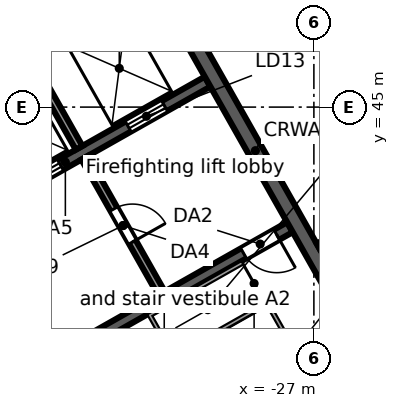
"""IFC4 building model, lengths in metres.
Left out: names, types, materials, properties, quantities, classifications, styles, units other than length and angle.
Written with IfcOpenShell. Run it as: python <this file> out.ifc"""

import sys

from ifc_helpers import new_model, si_unit, direction, frame, frame_2d, origin, place, context, subcontext, project, spatial, rectangle, extrude, element, fill, save


model = new_model("IFC4")
c1 = context("Model", 3, precision=1e-05, world=origin(), true_north=direction((0.0, 1.0)))
c2 = subcontext(c1, "Body", "Model", "MODEL_VIEW")
j1 = project(units=[si_unit("LENGTHUNIT", "METRE"), si_unit("PLANEANGLEUNIT", "RADIAN")], contexts=[c1])
p1 = place(None, origin())
s1 = spatial("IfcSite", under=j1, at=p1, CompositionType="ELEMENT")
p2 = place(p1, origin())
s2 = spatial("IfcBuilding", under=s1, at=p2, CompositionType="ELEMENT")
p3 = place(p2, frame((0.0, 0.0, 308.3)))
s3 = spatial("IfcBuildingStorey", under=s2, at=p3, CompositionType="ELEMENT", Elevation=308.3)
p4 = place(p3, frame((-58.732, 38.771, 0.0), z_axis=(0.0, 0.0, 1.0), x_axis=(0.870355615581, 0.492423702137, 0.0)))
e1 = element("IfcWall", 1, at=p4, inside=s3, PredefinedType="STANDARD", context=c2, shape_type="SweptSolid", body=[
    extrude(rectangle(XDim=64.052, YDim=0.25, at=frame_2d((32.026, 0.0))), origin(), (0.0, 0.0, 1.0), 3.45),
])
p5 = place(p4, frame((61.259, 0.0, 0.8)))
e2 = element("IfcOpeningElement", 2, at=p5, cuts=e1, PredefinedType="OPENING", context=c2, shape_type="SweptSolid", body=[
    extrude(rectangle(XDim=2.4, YDim=2.2, at=frame_2d((1.2, 1.1))), frame((0.0, 0.135, 0.0), z_axis=(0.0, -1.0, 0.0), x_axis=(1.0, 0.0, 0.0)), (0.0, 0.0, 1.0), 0.27),
])
p6 = place(p4, frame((58.216, 0.0, 0.8)))
e3 = element("IfcOpeningElement", 3, at=p6, cuts=e1, PredefinedType="OPENING", context=c2, shape_type="SweptSolid", body=[
    extrude(rectangle(XDim=2.4, YDim=2.2, at=frame_2d((1.2, 1.1))), frame((0.0, 0.135, 0.0), z_axis=(0.0, -1.0, 0.0), x_axis=(1.0, 0.0, 0.0)), (0.0, 0.0, 1.0), 0.27),
])
p7 = place(p4, frame((55.173, 0.0, 0.8)))
e4 = element("IfcOpeningElement", 4, at=p7, cuts=e1, PredefinedType="OPENING", context=c2, shape_type="SweptSolid", body=[
    extrude(rectangle(XDim=2.4, YDim=2.2, at=frame_2d((1.2, 1.1))), frame((0.0, 0.135, 0.0), z_axis=(0.0, -1.0, 0.0), x_axis=(1.0, 0.0, 0.0)), (0.0, 0.0, 1.0), 0.27),
])
p8 = place(p4, frame((52.129, 0.0, 0.8)))
e5 = element("IfcOpeningElement", 5, at=p8, cuts=e1, PredefinedType="OPENING", context=c2, shape_type="SweptSolid", body=[
    extrude(rectangle(XDim=2.4, YDim=2.2, at=frame_2d((1.2, 1.1))), frame((0.0, 0.135, 0.0), z_axis=(0.0, -1.0, 0.0), x_axis=(1.0, 0.0, 0.0)), (0.0, 0.0, 1.0), 0.27),
])
p9 = place(p4, frame((49.086, 0.0, 0.8)))
e6 = element("IfcOpeningElement", 6, at=p9, cuts=e1, PredefinedType="OPENING", context=c2, shape_type="SweptSolid", body=[
    extrude(rectangle(XDim=2.4, YDim=2.2, at=frame_2d((1.2, 1.1))), frame((0.0, 0.135, 0.0), z_axis=(0.0, -1.0, 0.0), x_axis=(1.0, 0.0, 0.0)), (0.0, 0.0, 1.0), 0.27),
])
p10 = place(p4, frame((46.043, 0.0, 0.8)))
e7 = element("IfcOpeningElement", 7, at=p10, cuts=e1, PredefinedType="OPENING", context=c2, shape_type="SweptSolid", body=[
    extrude(rectangle(XDim=2.4, YDim=2.2, at=frame_2d((1.2, 1.1))), frame((0.0, 0.135, 0.0), z_axis=(0.0, -1.0, 0.0), x_axis=(1.0, 0.0, 0.0)), (0.0, 0.0, 1.0), 0.27),
])
p11 = place(p4, frame((43.0, 0.0, 0.8)))
e8 = element("IfcOpeningElement", 8, at=p11, cuts=e1, PredefinedType="OPENING", context=c2, shape_type="SweptSolid", body=[
    extrude(rectangle(XDim=2.4, YDim=2.2, at=frame_2d((1.2, 1.1))), frame((0.0, 0.135, 0.0), z_axis=(0.0, -1.0, 0.0), x_axis=(1.0, 0.0, 0.0)), (0.0, 0.0, 1.0), 0.27),
])
p12 = place(p4, frame((39.956, 0.0, 0.8)))
e9 = element("IfcOpeningElement", 9, at=p12, cuts=e1, PredefinedType="OPENING", context=c2, shape_type="SweptSolid", body=[
    extrude(rectangle(XDim=2.4, YDim=2.2, at=frame_2d((1.2, 1.1))), frame((0.0, 0.135, 0.0), z_axis=(0.0, -1.0, 0.0), x_axis=(1.0, 0.0, 0.0)), (0.0, 0.0, 1.0), 0.27),
])
p13 = place(p4, frame((36.913, 0.0, 0.8)))
e10 = element("IfcOpeningElement", 10, at=p13, cuts=e1, PredefinedType="OPENING", context=c2, shape_type="SweptSolid", body=[
    extrude(rectangle(XDim=2.4, YDim=2.2, at=frame_2d((1.2, 1.1))), frame((0.0, 0.135, 0.0), z_axis=(0.0, -1.0, 0.0), x_axis=(1.0, 0.0, 0.0)), (0.0, 0.0, 1.0), 0.27),
])
p14 = place(p4, frame((33.87, 0.0, 0.8)))
e11 = element("IfcOpeningElement", 11, at=p14, cuts=e1, PredefinedType="OPENING", context=c2, shape_type="SweptSolid", body=[
    extrude(rectangle(XDim=2.4, YDim=2.2, at=frame_2d((1.2, 1.1))), frame((0.0, 0.135, 0.0), z_axis=(0.0, -1.0, 0.0), x_axis=(1.0, 0.0, 0.0)), (0.0, 0.0, 1.0), 0.27),
])
p15 = place(p4, frame((30.826, 0.0, 0.8)))
e12 = element("IfcOpeningElement", 12, at=p15, cuts=e1, PredefinedType="OPENING", context=c2, shape_type="SweptSolid", body=[
    extrude(rectangle(XDim=2.4, YDim=2.2, at=frame_2d((1.2, 1.1))), frame((0.0, 0.135, 0.0), z_axis=(0.0, -1.0, 0.0), x_axis=(1.0, 0.0, 0.0)), (0.0, 0.0, 1.0), 0.27),
])
p16 = place(p4, frame((27.783, 0.0, 0.8)))
e13 = element("IfcOpeningElement", 13, at=p16, cuts=e1, PredefinedType="OPENING", context=c2, shape_type="SweptSolid", body=[
    extrude(rectangle(XDim=2.4, YDim=2.2, at=frame_2d((1.2, 1.1))), frame((0.0, 0.135, 0.0), z_axis=(0.0, -1.0, 0.0), x_axis=(1.0, 0.0, 0.0)), (0.0, 0.0, 1.0), 0.27),
])
p17 = place(p4, frame((24.74, 0.0, 0.8)))
e14 = element("IfcOpeningElement", 14, at=p17, cuts=e1, PredefinedType="OPENING", context=c2, shape_type="SweptSolid", body=[
    extrude(rectangle(XDim=2.4, YDim=2.2, at=frame_2d((1.2, 1.1))), frame((0.0, 0.135, 0.0), z_axis=(0.0, -1.0, 0.0), x_axis=(1.0, 0.0, 0.0)), (0.0, 0.0, 1.0), 0.27),
])
p18 = place(p4, frame((21.696, 0.0, 0.8)))
e15 = element("IfcOpeningElement", 15, at=p18, cuts=e1, PredefinedType="OPENING", context=c2, shape_type="SweptSolid", body=[
    extrude(rectangle(XDim=2.4, YDim=2.2, at=frame_2d((1.2, 1.1))), frame((0.0, 0.135, 0.0), z_axis=(0.0, -1.0, 0.0), x_axis=(1.0, 0.0, 0.0)), (0.0, 0.0, 1.0), 0.27),
])
p19 = place(p4, frame((18.653, 0.0, 0.8)))
e16 = element("IfcOpeningElement", 16, at=p19, cuts=e1, PredefinedType="OPENING", context=c2, shape_type="SweptSolid", body=[
    extrude(rectangle(XDim=2.4, YDim=2.2, at=frame_2d((1.2, 1.1))), frame((0.0, 0.135, 0.0), z_axis=(0.0, -1.0, 0.0), x_axis=(1.0, 0.0, 0.0)), (0.0, 0.0, 1.0), 0.27),
])
p20 = place(p4, frame((15.61, 0.0, 0.8)))
e17 = element("IfcOpeningElement", 17, at=p20, cuts=e1, PredefinedType="OPENING", context=c2, shape_type="SweptSolid", body=[
    extrude(rectangle(XDim=2.4, YDim=2.2, at=frame_2d((1.2, 1.1))), frame((0.0, 0.135, 0.0), z_axis=(0.0, -1.0, 0.0), x_axis=(1.0, 0.0, 0.0)), (0.0, 0.0, 1.0), 0.27),
])
p21 = place(p4, frame((12.567, 0.0, 0.8)))
e18 = element("IfcOpeningElement", 18, at=p21, cuts=e1, PredefinedType="OPENING", context=c2, shape_type="SweptSolid", body=[
    extrude(rectangle(XDim=2.4, YDim=2.2, at=frame_2d((1.2, 1.1))), frame((0.0, 0.135, 0.0), z_axis=(0.0, -1.0, 0.0), x_axis=(1.0, 0.0, 0.0)), (0.0, 0.0, 1.0), 0.27),
])
p22 = place(p4, frame((9.523, 0.0, 0.8)))
e19 = element("IfcOpeningElement", 19, at=p22, cuts=e1, PredefinedType="OPENING", context=c2, shape_type="SweptSolid", body=[
    extrude(rectangle(XDim=2.4, YDim=2.2, at=frame_2d((1.2, 1.1))), frame((0.0, 0.135, 0.0), z_axis=(0.0, -1.0, 0.0), x_axis=(1.0, 0.0, 0.0)), (0.0, 0.0, 1.0), 0.27),
])
p23 = place(p4, frame((6.48, 0.0, 0.8)))
e20 = element("IfcOpeningElement", 20, at=p23, cuts=e1, PredefinedType="OPENING", context=c2, shape_type="SweptSolid", body=[
    extrude(rectangle(XDim=2.4, YDim=2.2, at=frame_2d((1.2, 1.1))), frame((0.0, 0.135, 0.0), z_axis=(0.0, -1.0, 0.0), x_axis=(1.0, 0.0, 0.0)), (0.0, 0.0, 1.0), 0.27),
])
p24 = place(p4, frame((3.437, 0.0, 0.8)))
e21 = element("IfcOpeningElement", 21, at=p24, cuts=e1, PredefinedType="OPENING", context=c2, shape_type="SweptSolid", body=[
    extrude(rectangle(XDim=2.4, YDim=2.2, at=frame_2d((1.2, 1.1))), frame((0.0, 0.135, 0.0), z_axis=(0.0, -1.0, 0.0), x_axis=(1.0, 0.0, 0.0)), (0.0, 0.0, 1.0), 0.27),
])
p25 = place(p4, frame((0.393, 0.0, 0.8)))
e22 = element("IfcOpeningElement", 22, at=p25, cuts=e1, PredefinedType="OPENING", context=c2, shape_type="SweptSolid", body=[
    extrude(rectangle(XDim=2.4, YDim=2.2, at=frame_2d((1.2, 1.1))), frame((0.0, 0.135, 0.0), z_axis=(0.0, -1.0, 0.0), x_axis=(1.0, 0.0, 0.0)), (0.0, 0.0, 1.0), 0.27),
])
p26 = place(p3, frame((-3.017, 46.293, 0.0), z_axis=(0.0, 0.0, 1.0), x_axis=(-0.870355474887, -0.492423950812, 0.0)))
e23 = element("IfcWall", 23, at=p26, inside=s3, PredefinedType="STANDARD", context=c2, shape_type="SweptSolid", body=[
    extrude(rectangle(XDim=40.34, YDim=0.25, at=frame_2d((20.17, 0.0))), origin(), (0.0, 0.0, 1.0), 3.45),
])
p27 = place(p26, frame((37.428, 0.0, 0.8)))
e24 = element("IfcOpeningElement", 24, at=p27, cuts=e23, PredefinedType="OPENING", context=c2, shape_type="SweptSolid", body=[
    extrude(rectangle(XDim=2.4, YDim=2.2, at=frame_2d((1.2, 1.1))), frame((0.0, 0.135, 0.0), z_axis=(0.0, -1.0, 0.0), x_axis=(1.0, 0.0, 0.0)), (0.0, 0.0, 1.0), 0.27),
])
p28 = place(p26, frame((34.372, 0.0, 0.0)))
e25 = element("IfcOpeningElement", 25, at=p28, cuts=e23, PredefinedType="OPENING", context=c2, shape_type="SweptSolid", body=[
    extrude(rectangle(XDim=1.8, YDim=2.4, at=frame_2d((0.9, 1.2))), frame((0.0, 0.135, 0.0), z_axis=(0.0, -1.0, 0.0), x_axis=(1.0, 0.0, 0.0)), (0.0, 0.0, 1.0), 0.27),
])
p29 = place(p26, frame((30.716, 0.0, 0.8)))
e26 = element("IfcOpeningElement", 26, at=p29, cuts=e23, PredefinedType="OPENING", context=c2, shape_type="SweptSolid", body=[
    extrude(rectangle(XDim=2.4, YDim=2.2, at=frame_2d((1.2, 1.1))), frame((0.0, 0.135, 0.0), z_axis=(0.0, -1.0, 0.0), x_axis=(1.0, 0.0, 0.0)), (0.0, 0.0, 1.0), 0.27),
])
p30 = place(p26, frame((27.36, 0.0, 0.8)))
e27 = element("IfcOpeningElement", 27, at=p30, cuts=e23, PredefinedType="OPENING", context=c2, shape_type="SweptSolid", body=[
    extrude(rectangle(XDim=2.4, YDim=2.2, at=frame_2d((1.2, 1.1))), frame((0.0, 0.135, 0.0), z_axis=(0.0, -1.0, 0.0), x_axis=(1.0, 0.0, 0.0)), (0.0, 0.0, 1.0), 0.27),
])
p31 = place(p26, frame((24.304, 0.0, 0.0)))
e28 = element("IfcOpeningElement", 28, at=p31, cuts=e23, PredefinedType="OPENING", context=c2, shape_type="SweptSolid", body=[
    extrude(rectangle(XDim=1.8, YDim=2.4, at=frame_2d((0.9, 1.2))), frame((0.0, 0.135, 0.0), z_axis=(0.0, -1.0, 0.0), x_axis=(1.0, 0.0, 0.0)), (0.0, 0.0, 1.0), 0.27),
])
p32 = place(p26, frame((20.648, 0.0, 0.8)))
e29 = element("IfcOpeningElement", 29, at=p32, cuts=e23, PredefinedType="OPENING", context=c2, shape_type="SweptSolid", body=[
    extrude(rectangle(XDim=2.4, YDim=2.2, at=frame_2d((1.2, 1.1))), frame((0.0, 0.135, 0.0), z_axis=(0.0, -1.0, 0.0), x_axis=(1.0, 0.0, 0.0)), (0.0, 0.0, 1.0), 0.27),
])
p33 = place(p26, frame((17.292, 0.0, 0.8)))
e30 = element("IfcOpeningElement", 30, at=p33, cuts=e23, PredefinedType="OPENING", context=c2, shape_type="SweptSolid", body=[
    extrude(rectangle(XDim=2.4, YDim=2.2, at=frame_2d((1.2, 1.1))), frame((0.0, 0.135, 0.0), z_axis=(0.0, -1.0, 0.0), x_axis=(1.0, 0.0, 0.0)), (0.0, 0.0, 1.0), 0.27),
])
p34 = place(p26, frame((14.236, 0.0, 0.0)))
e31 = element("IfcOpeningElement", 31, at=p34, cuts=e23, PredefinedType="OPENING", context=c2, shape_type="SweptSolid", body=[
    extrude(rectangle(XDim=1.8, YDim=2.4, at=frame_2d((0.9, 1.2))), frame((0.0, 0.135, 0.0), z_axis=(0.0, -1.0, 0.0), x_axis=(1.0, 0.0, 0.0)), (0.0, 0.0, 1.0), 0.27),
])
p35 = place(p26, frame((10.58, 0.0, 0.8)))
e32 = element("IfcOpeningElement", 32, at=p35, cuts=e23, PredefinedType="OPENING", context=c2, shape_type="SweptSolid", body=[
    extrude(rectangle(XDim=2.4, YDim=2.2, at=frame_2d((1.2, 1.1))), frame((0.0, 0.135, 0.0), z_axis=(0.0, -1.0, 0.0), x_axis=(1.0, 0.0, 0.0)), (0.0, 0.0, 1.0), 0.27),
])
p36 = place(p26, frame((7.224, 0.0, 0.8)))
e33 = element("IfcOpeningElement", 33, at=p36, cuts=e23, PredefinedType="OPENING", context=c2, shape_type="SweptSolid", body=[
    extrude(rectangle(XDim=2.4, YDim=2.2, at=frame_2d((1.2, 1.1))), frame((0.0, 0.135, 0.0), z_axis=(0.0, -1.0, 0.0), x_axis=(1.0, 0.0, 0.0)), (0.0, 0.0, 1.0), 0.27),
])
p37 = place(p26, frame((4.168, 0.0, 0.0)))
e34 = element("IfcOpeningElement", 34, at=p37, cuts=e23, PredefinedType="OPENING", context=c2, shape_type="SweptSolid", body=[
    extrude(rectangle(XDim=1.8, YDim=2.4, at=frame_2d((0.9, 1.2))), frame((0.0, 0.135, 0.0), z_axis=(0.0, -1.0, 0.0), x_axis=(1.0, 0.0, 0.0)), (0.0, 0.0, 1.0), 0.27),
])
p38 = place(p26, frame((0.512, 0.0, 0.8)))
e35 = element("IfcOpeningElement", 35, at=p38, cuts=e23, PredefinedType="OPENING", context=c2, shape_type="SweptSolid", body=[
    extrude(rectangle(XDim=2.4, YDim=2.2, at=frame_2d((1.2, 1.1))), frame((0.0, 0.135, 0.0), z_axis=(0.0, -1.0, 0.0), x_axis=(1.0, 0.0, 0.0)), (0.0, 0.0, 1.0), 0.27),
])
p39 = place(p3, frame((-34.245, 38.097, 0.0), z_axis=(0.0, 0.0, 1.0), x_axis=(0.870356351998, 0.492422400523, 0.0)))
e36 = element("IfcWall", 36, at=p39, inside=s3, PredefinedType="SOLIDWALL", context=c2, shape_type="SweptSolid", body=[
    extrude(rectangle(XDim=7.6, YDim=0.3, at=frame_2d((3.8, 0.0))), origin(), (0.0, 0.0, 1.0), 3.45),
])
p40 = place(p39, frame((6.2, 0.0, 0.0)))
e37 = element("IfcOpeningElement", 37, at=p40, cuts=e36, PredefinedType="OPENING", context=c2, shape_type="SweptSolid", body=[
    extrude(rectangle(XDim=1.0, YDim=2.1, at=frame_2d((0.5, 1.05))), frame((0.0, 0.16, 0.0), z_axis=(0.0, -1.0, 0.0), x_axis=(1.0, 0.0, 0.0)), (0.0, 0.0, 1.0), 0.32),
])
p41 = place(p3, frame((-37.282, 41.435, 0.0), z_axis=(0.0, 0.0, 1.0), x_axis=(0.870361315115, 0.492413628113, 0.0)))
e38 = element("IfcWall", 38, at=p41, inside=s3, PredefinedType="SOLIDWALL", context=c2, shape_type="SweptSolid", body=[
    extrude(rectangle(XDim=8.6, YDim=0.3, at=frame_2d((4.3, 0.0))), origin(), (0.0, 0.0, 1.0), 3.45),
])
p42 = place(p41, frame((0.65, 0.0, 0.0)))
e39 = element("IfcOpeningElement", 39, at=p42, cuts=e38, PredefinedType="OPENING", context=c2, shape_type="SweptSolid", body=[
    extrude(rectangle(XDim=1.1, YDim=2.1, at=frame_2d((0.55, 1.05))), frame((0.0, 0.16, 0.0), z_axis=(0.0, -1.0, 0.0), x_axis=(1.0, 0.0, 0.0)), (0.0, 0.0, 1.0), 0.32),
])
p43 = place(p41, frame((3.05, 0.0, 0.0)))
e40 = element("IfcOpeningElement", 40, at=p43, cuts=e38, PredefinedType="OPENING", context=c2, shape_type="SweptSolid", body=[
    extrude(rectangle(XDim=1.1, YDim=2.1, at=frame_2d((0.55, 1.05))), frame((0.0, 0.16, 0.0), z_axis=(0.0, -1.0, 0.0), x_axis=(1.0, 0.0, 0.0)), (0.0, 0.0, 1.0), 0.32),
])
p44 = place(p41, frame((6.2, 0.0, 0.0)))
e41 = element("IfcOpeningElement", 41, at=p44, cuts=e38, PredefinedType="OPENING", context=c2, shape_type="SweptSolid", body=[
    extrude(rectangle(XDim=1.1, YDim=2.1, at=frame_2d((0.55, 1.05))), frame((0.0, 0.16, 0.0), z_axis=(0.0, -1.0, 0.0), x_axis=(1.0, 0.0, 0.0)), (0.0, 0.0, 1.0), 0.32),
])
p45 = place(p3, frame((-46.51, 41.499, 0.0), z_axis=(0.0, 0.0, 1.0), x_axis=(0.870356271124, 0.492422543467, 0.0)))
e42 = element("IfcWall", 42, at=p45, inside=s3, PredefinedType="SOLIDWALL", context=c2, shape_type="SweptSolid", body=[
    extrude(rectangle(XDim=17.0, YDim=0.4, at=frame_2d((8.5, 0.0))), origin(), (0.0, 0.0, 1.0), 3.45),
])
p46 = place(p3, frame((-33.031, 43.667, 0.0), z_axis=(0.0, 0.0, 1.0), x_axis=(0.492408451753, -0.87036424366, 0.0)))
e43 = element("IfcWall", 43, at=p46, inside=s3, PredefinedType="PARTITIONING", context=c2, shape_type="SweptSolid", body=[
    extrude(rectangle(XDim=4.1, YDim=0.2, at=frame_2d((2.05, 0.0))), origin(), (0.0, 0.0, 1.0), 3.45),
])
p47 = place(p46, frame((1.55, 0.0, 0.0)))
e44 = element("IfcOpeningElement", 44, at=p47, cuts=e43, PredefinedType="OPENING", context=c2, shape_type="SweptSolid", body=[
    extrude(rectangle(XDim=1.0, YDim=2.1, at=frame_2d((0.5, 1.05))), frame((0.0, 0.11, 0.0), z_axis=(0.0, -1.0, 0.0), x_axis=(1.0, 0.0, 0.0)), (0.0, 0.0, 1.0), 0.22),
])
p48 = place(p3, frame((-35.271, 47.628, 0.0), z_axis=(0.0, 0.0, 1.0), x_axis=(0.492422543467, -0.870356271124, 0.0)))
e45 = element("IfcWall", 45, at=p48, inside=s3, PredefinedType="SOLIDWALL", context=c2, shape_type="SweptSolid", body=[
    extrude(rectangle(XDim=4.25, YDim=0.2, at=frame_2d((2.125, 0.0))), origin(), (0.0, 0.0, 1.0), 3.45),
])
p49 = place(p3, frame((-31.79, 49.597, 0.0), z_axis=(0.0, 0.0, 1.0), x_axis=(0.492421663121, -0.870356769198, 0.0)))
e46 = element("IfcWall", 46, at=p49, inside=s3, PredefinedType="SOLIDWALL", context=c2, shape_type="SweptSolid", body=[
    extrude(rectangle(XDim=13.2, YDim=0.4, at=frame_2d((6.6, 0.0))), origin(), (0.0, 0.0, 1.0), 3.45),
])
p50 = place(p3, frame((-26.888, 41.34, 0.0), z_axis=(0.0, 0.0, 1.0), x_axis=(0.8702292093, 0.492647057518, 0.0)))
e47 = element("IfcWall", 47, at=p50, inside=s3, PredefinedType="PARTITIONING", context=c2, shape_type="SweptSolid", body=[
    extrude(rectangle(XDim=3.0, YDim=0.15, at=frame_2d((1.5, 0.0))), origin(), (0.0, 0.0, 1.0), 2.622),
])
p51 = place(p43, origin())
e48 = element("IfcDoor", 48, at=p51, inside=s3, OperationType="DOUBLE_DOOR_SLIDING", PredefinedType="DOOR", context=c2, shape_type="SweptSolid", body=[
    extrude(rectangle(XDim=1.1, YDim=2.1, at=frame_2d((0.55, 1.05))), frame((0.0, 0.025, 0.0), z_axis=(0.0, -1.0, 0.0), x_axis=(1.0, 0.0, 0.0)), (0.0, 0.0, 1.0), 0.05),
])
fill(e40, e48)
p52 = place(p44, origin())
e49 = element("IfcDoor", 49, at=p52, inside=s3, OperationType="DOUBLE_DOOR_SLIDING", PredefinedType="DOOR", context=c2, shape_type="SweptSolid", body=[
    extrude(rectangle(XDim=1.1, YDim=2.1, at=frame_2d((0.55, 1.05))), frame((0.0, 0.025, 0.0), z_axis=(0.0, -1.0, 0.0), x_axis=(1.0, 0.0, 0.0)), (0.0, 0.0, 1.0), 0.05),
])
fill(e41, e49)
p53 = place(p40, frame((1.0, 0.0, 0.0), z_axis=(0.0, 0.0, 1.0), x_axis=(-1.0, 0.0, 0.0)))
e50 = element("IfcDoor", 50, at=p53, inside=s3, OperationType="SINGLE_SWING_LEFT", PredefinedType="DOOR", context=c2, shape_type="SweptSolid", body=[
    extrude(rectangle(XDim=1.0, YDim=2.1, at=frame_2d((0.5, 1.05))), frame((0.0, 0.025, 0.0), z_axis=(0.0, -1.0, 0.0), x_axis=(1.0, 0.0, 0.0)), (0.0, 0.0, 1.0), 0.05),
])
fill(e37, e50)
p54 = place(p47, origin())
e51 = element("IfcDoor", 51, at=p54, inside=s3, OperationType="SINGLE_SWING_RIGHT", PredefinedType="DOOR", context=c2, shape_type="SweptSolid", body=[
    extrude(rectangle(XDim=1.0, YDim=2.1, at=frame_2d((0.5, 1.05))), frame((0.0, 0.025, 0.0), z_axis=(0.0, -1.0, 0.0), x_axis=(1.0, 0.0, 0.0)), (0.0, 0.0, 1.0), 0.05),
])
fill(e44, e51)
save(model, sys.argv[1])
